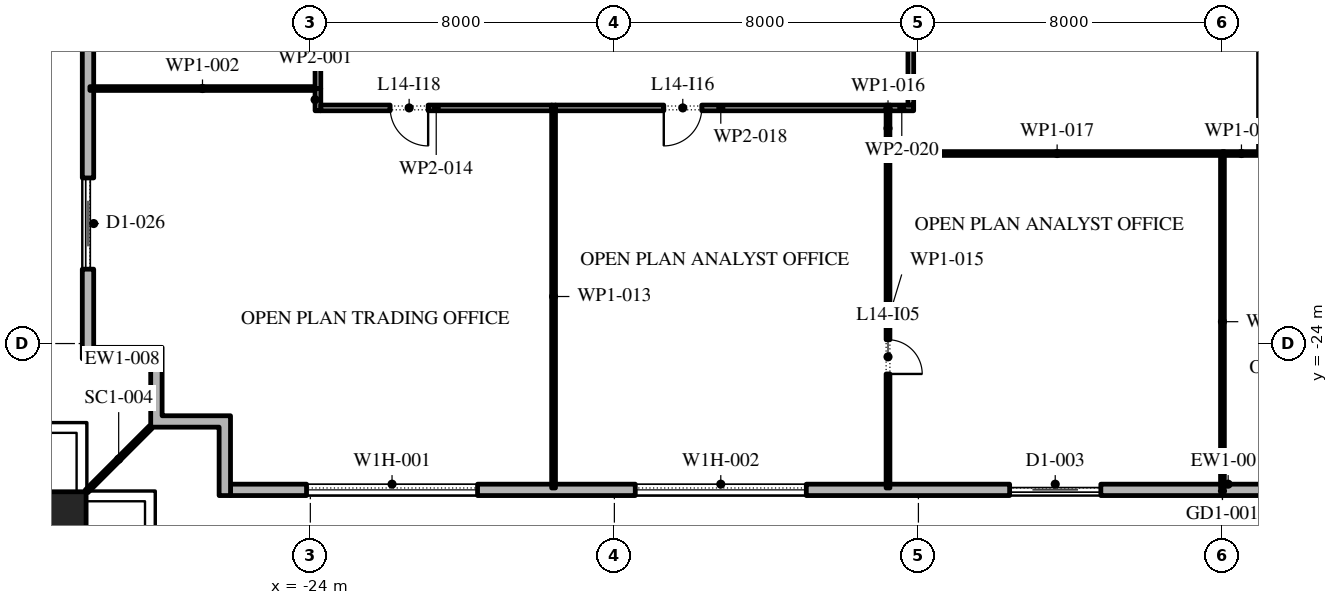
"""IFC4 building model, lengths in metres.
Left out: names, types, materials, properties, quantities, classifications, styles, units other than length and angle.
Written with IfcOpenShell. Run it as: python <this file> out.ifc"""

import sys

from ifc_helpers import new_model, si_unit, direction, frame, frame_2d, origin, origin_2d, place, context, subcontext, project, spatial, polyline, rectangle, outline, extrude, element, fill, save


model = new_model("IFC4")
c1 = context("Model", 3, precision=1e-05, world=origin(), true_north=direction((0.0, 1.0)))
c2 = subcontext(c1, "Body", "Model", "MODEL_VIEW")
j1 = project(units=[si_unit("LENGTHUNIT", "METRE"), si_unit("PLANEANGLEUNIT", "RADIAN")], contexts=[c1])
p1 = place(None, origin())
s1 = spatial("IfcSite", under=j1, at=p1, CompositionType="ELEMENT")
p2 = place(p1, origin())
s2 = spatial("IfcBuilding", under=s1, at=p2, CompositionType="ELEMENT")
p3 = place(p2, frame((0.0, 0.0, 69.0)))
s3 = spatial("IfcBuildingStorey", under=s2, at=p3, CompositionType="ELEMENT", Elevation=69.0)
p4 = place(p3, frame((-30.6, -28.6, 0.0), z_axis=(0.0, 0.0, 1.0), x_axis=(1.0, 0.0, 0.0)))
e1 = element("IfcColumn", 1, at=p4, inside=s3, PredefinedType="COLUMN", context=c2, shape_type="SweptSolid", body=[
    extrude(rectangle(XDim=1.4, YDim=1.4, at=origin_2d()), origin(), (0.0, 0.0, 1.0), 4.2),
])
p5 = place(p3, frame((-26.1, -27.85, 0.0), z_axis=(0.0, 0.0, 1.0), x_axis=(1.0, 0.0, 0.0)))
e2 = element("IfcWall", 2, at=p5, inside=s3, PredefinedType="STANDARD", context=c2, shape_type="SweptSolid", body=[
    extrude(rectangle(XDim=52.5, YDim=0.3, at=frame_2d((26.25, 0.0))), origin(), (0.0, 0.0, 1.0), 4.0),
])
p6 = place(p5, frame((2.0, 0.0, 0.45)))
e3 = element("IfcOpeningElement", 3, at=p6, cuts=e2, PredefinedType="OPENING", context=c2, shape_type="SweptSolid", body=[
    extrude(rectangle(XDim=4.5, YDim=2.75, at=frame_2d((2.25, 1.375))), frame((0.0, 0.16, 0.0), z_axis=(0.0, -1.0, 0.0), x_axis=(1.0, 0.0, 0.0)), (0.0, 0.0, 1.0), 0.32),
])
p7 = place(p5, frame((10.65, 0.0, 0.45)))
e4 = element("IfcOpeningElement", 4, at=p7, cuts=e2, PredefinedType="OPENING", context=c2, shape_type="SweptSolid", body=[
    extrude(rectangle(XDim=4.5, YDim=2.75, at=frame_2d((2.25, 1.375))), frame((0.0, 0.16, 0.0), z_axis=(0.0, -1.0, 0.0), x_axis=(1.0, 0.0, 0.0)), (0.0, 0.0, 1.0), 0.32),
])
p8 = place(p5, frame((20.5, 0.0, 0.0)))
e5 = element("IfcOpeningElement", 5, at=p8, cuts=e2, PredefinedType="OPENING", context=c2, shape_type="SweptSolid", body=[
    extrude(rectangle(XDim=2.4, YDim=3.5, at=frame_2d((1.2, 1.75))), frame((0.0, 0.16, 0.0), z_axis=(0.0, -1.0, 0.0), x_axis=(1.0, 0.0, 0.0)), (0.0, 0.0, 1.0), 0.32),
])
p9 = place(p5, frame((28.25, 0.0, 0.45)))
e6 = element("IfcOpeningElement", 6, at=p9, cuts=e2, PredefinedType="OPENING", context=c2, shape_type="SweptSolid", body=[
    extrude(rectangle(XDim=4.5, YDim=2.75, at=frame_2d((2.25, 1.375))), frame((0.0, 0.16, 0.0), z_axis=(0.0, -1.0, 0.0), x_axis=(1.0, 0.0, 0.0)), (0.0, 0.0, 1.0), 0.32),
])
p10 = place(p5, frame((37.05, 0.0, 0.45)))
e7 = element("IfcOpeningElement", 7, at=p10, cuts=e2, PredefinedType="OPENING", context=c2, shape_type="SweptSolid", body=[
    extrude(rectangle(XDim=4.5, YDim=2.75, at=frame_2d((2.25, 1.375))), frame((0.0, 0.16, 0.0), z_axis=(0.0, -1.0, 0.0), x_axis=(1.0, 0.0, 0.0)), (0.0, 0.0, 1.0), 0.32),
])
p11 = place(p5, frame((45.85, 0.0, 0.45)))
e8 = element("IfcOpeningElement", 8, at=p11, cuts=e2, PredefinedType="OPENING", context=c2, shape_type="SweptSolid", body=[
    extrude(rectangle(XDim=4.5, YDim=2.75, at=frame_2d((2.25, 1.375))), frame((0.0, 0.16, 0.0), z_axis=(0.0, -1.0, 0.0), x_axis=(1.0, 0.0, 0.0)), (0.0, 0.0, 1.0), 0.32),
])
p12 = place(p3, frame((-29.85, 25.1, 0.0), z_axis=(0.0, 0.0, 1.0), x_axis=(0.0, -1.0, 0.0)))
e9 = element("IfcWall", 9, at=p12, inside=s3, PredefinedType="STANDARD", context=c2, shape_type="SweptSolid", body=[
    extrude(rectangle(XDim=49.5, YDim=0.3, at=frame_2d((24.75, 0.0))), origin(), (0.0, 0.0, 1.0), 4.0),
])
p13 = place(p12, frame((1.157, 0.0, 0.45)))
e10 = element("IfcOpeningElement", 10, at=p13, cuts=e9, PredefinedType="OPENING", context=c2, shape_type="SweptSolid", body=[
    extrude(rectangle(XDim=4.5, YDim=2.875, at=frame_2d((2.25, 1.438))), frame((0.0, 0.16, 0.0), z_axis=(0.0, -1.0, 0.0), x_axis=(1.0, 0.0, 0.0)), (0.0, 0.0, 1.0), 0.32),
])
p14 = place(p12, frame((8.121, 0.0, 0.45)))
e11 = element("IfcOpeningElement", 11, at=p14, cuts=e9, PredefinedType="OPENING", context=c2, shape_type="SweptSolid", body=[
    extrude(rectangle(XDim=4.5, YDim=3.05, at=frame_2d((2.25, 1.525))), frame((0.0, 0.16, 0.0), z_axis=(0.0, -1.0, 0.0), x_axis=(1.0, 0.0, 0.0)), (0.0, 0.0, 1.0), 0.32),
])
p15 = place(p12, frame((16.286, 0.0, 0.0)))
e12 = element("IfcOpeningElement", 12, at=p15, cuts=e9, PredefinedType="OPENING", context=c2, shape_type="SweptSolid", body=[
    extrude(rectangle(XDim=2.4, YDim=3.325, at=frame_2d((1.2, 1.663))), frame((0.0, 0.16, 0.0), z_axis=(0.0, -1.0, 0.0), x_axis=(1.0, 0.0, 0.0)), (0.0, 0.0, 1.0), 0.32),
])
p16 = place(p12, frame((22.35, 0.0, 0.45)))
e13 = element("IfcOpeningElement", 13, at=p16, cuts=e9, PredefinedType="OPENING", context=c2, shape_type="SweptSolid", body=[
    extrude(rectangle(XDim=4.5, YDim=2.875, at=frame_2d((2.25, 1.438))), frame((0.0, 0.16, 0.0), z_axis=(0.0, -1.0, 0.0), x_axis=(1.0, 0.0, 0.0)), (0.0, 0.0, 1.0), 0.32),
])
p17 = place(p12, frame((29.464, 0.0, 0.45)))
e14 = element("IfcOpeningElement", 14, at=p17, cuts=e9, PredefinedType="OPENING", context=c2, shape_type="SweptSolid", body=[
    extrude(rectangle(XDim=4.5, YDim=2.875, at=frame_2d((2.25, 1.438))), frame((0.0, 0.16, 0.0), z_axis=(0.0, -1.0, 0.0), x_axis=(1.0, 0.0, 0.0)), (0.0, 0.0, 1.0), 0.32),
])
p18 = place(p12, frame((36.579, 0.0, 0.45)))
e15 = element("IfcOpeningElement", 15, at=p18, cuts=e9, PredefinedType="OPENING", context=c2, shape_type="SweptSolid", body=[
    extrude(rectangle(XDim=4.5, YDim=2.825, at=frame_2d((2.25, 1.413))), frame((0.0, 0.16, 0.0), z_axis=(0.0, -1.0, 0.0), x_axis=(1.0, 0.0, 0.0)), (0.0, 0.0, 1.0), 0.32),
])
p19 = place(p12, frame((44.743, 0.0, 0.0)))
e16 = element("IfcOpeningElement", 16, at=p19, cuts=e9, PredefinedType="OPENING", context=c2, shape_type="SweptSolid", body=[
    extrude(rectangle(XDim=2.4, YDim=3.5, at=frame_2d((1.2, 1.75))), frame((0.0, 0.16, 0.0), z_axis=(0.0, -1.0, 0.0), x_axis=(1.0, 0.0, 0.0)), (0.0, 0.0, 1.0), 0.32),
])
p20 = place(p3, origin())
e17 = element("IfcWall", 17, at=p20, inside=s3, PredefinedType="STANDARD", context=c2, shape_type="SweptSolid", body=[
    extrude(outline(polyline([(-26.4, -26.2), (-28.2, -26.2), (-28.2, -24.4), (-29.7, -24.4), (-29.7, -24.1), (-27.9, -24.1), (-27.9, -25.9), (-26.1, -25.9), (-26.1, -28.0), (-26.4, -28.0), (-26.4, -26.2)])), origin(), (0.0, 0.0, 1.0), 4.0),
])
p21 = place(p3, frame((-28.2, -26.2, -0.05), z_axis=(0.0, 0.0, 1.0), x_axis=(-0.707106781187, -0.707106781187, 0.0)))
e18 = element("IfcWall", 18, at=p21, inside=s3, PredefinedType="STANDARD", context=c2, shape_type="SweptSolid", body=[
    extrude(rectangle(XDim=2.385, YDim=0.1, at=frame_2d((1.192, 0.0))), origin(), (0.0, 0.0, 1.0), 4.05),
])
p22 = place(p3, frame((-23.8, -17.875, 0.0), z_axis=(0.0, 0.0, 1.0), x_axis=(0.0, 1.0, 0.0)))
e19 = element("IfcWall", 19, at=p22, inside=s3, PredefinedType="PARTITIONING", context=c2, shape_type="SweptSolid", body=[
    extrude(rectangle(XDim=0.585, YDim=0.15, at=frame_2d((0.292, 0.0))), origin(), (0.0, 0.0, 1.0), 4.0),
])
p23 = place(p3, frame((-23.875, -17.29, 0.0), z_axis=(0.0, 0.0, 1.0), x_axis=(-1.0, 0.0, 0.0)))
e20 = element("IfcWall", 20, at=p23, inside=s3, PredefinedType="PARTITIONING", context=c2, shape_type="SweptSolid", body=[
    extrude(rectangle(XDim=5.925, YDim=0.1, at=frame_2d((2.962, 0.0))), origin(), (0.0, 0.0, 1.0), 4.0),
])
p24 = place(p3, frame((-23.8, -17.29, 0.0), z_axis=(0.0, 0.0, 1.0), x_axis=(0.0, 1.0, 0.0)))
e21 = element("IfcWall", 21, at=p24, inside=s3, PredefinedType="PARTITIONING", context=c2, shape_type="SweptSolid", body=[
    extrude(rectangle(XDim=7.17, YDim=0.15, at=frame_2d((3.585, 0.0))), origin(), (0.0, 0.0, 1.0), 4.0),
])
p25 = place(p24, frame((2.47, 0.0, 0.0)))
e22 = element("IfcOpeningElement", 22, at=p25, cuts=e21, PredefinedType="OPENING", context=c2, shape_type="SweptSolid", body=[
    extrude(rectangle(XDim=1.0, YDim=2.1, at=frame_2d((0.5, 1.05))), frame((0.0, 0.085, 0.0), z_axis=(0.0, -1.0, 0.0), x_axis=(1.0, 0.0, 0.0)), (0.0, 0.0, 1.0), 0.17),
])
p26 = place(p3, frame((-17.6, -27.8, 0.0), z_axis=(0.0, 0.0, 1.0), x_axis=(0.0, 1.0, 0.0)))
e23 = element("IfcWall", 23, at=p26, inside=s3, PredefinedType="PARTITIONING", context=c2, shape_type="SweptSolid", body=[
    extrude(rectangle(XDim=10.075, YDim=0.1, at=frame_2d((5.038, 0.0))), origin(), (0.0, 0.0, 1.0), 4.0),
])
p27 = place(p3, frame((-17.65, -17.8, 0.0), z_axis=(0.0, 0.0, 1.0), x_axis=(-1.0, 0.0, 0.0)))
e24 = element("IfcWall", 24, at=p27, inside=s3, PredefinedType="PARTITIONING", context=c2, shape_type="SweptSolid", body=[
    extrude(rectangle(XDim=6.075, YDim=0.15, at=frame_2d((3.038, 0.0))), origin(), (0.0, 0.0, 1.0), 4.0),
])
p28 = place(p27, frame((3.25, 0.0, 0.0)))
e25 = element("IfcOpeningElement", 25, at=p28, cuts=e24, PredefinedType="OPENING", context=c2, shape_type="SweptSolid", body=[
    extrude(rectangle(XDim=1.0, YDim=2.1, at=frame_2d((0.5, 1.05))), frame((0.0, 0.085, 0.0), z_axis=(0.0, -1.0, 0.0), x_axis=(1.0, 0.0, 0.0)), (0.0, 0.0, 1.0), 0.17),
])
p29 = place(p3, frame((-8.8, -27.8, 0.0), z_axis=(0.0, 0.0, 1.0), x_axis=(0.0, 1.0, 0.0)))
e26 = element("IfcWall", 26, at=p29, inside=s3, PredefinedType="PARTITIONING", context=c2, shape_type="SweptSolid", body=[
    extrude(rectangle(XDim=8.85, YDim=0.1, at=frame_2d((4.425, 0.0))), origin(), (0.0, 0.0, 1.0), 4.0),
])
p30 = place(p29, frame((3.0, 0.0, 0.0)))
e27 = element("IfcOpeningElement", 27, at=p30, cuts=e26, PredefinedType="OPENING", context=c2, shape_type="SweptSolid", body=[
    extrude(rectangle(XDim=0.9, YDim=2.1, at=frame_2d((0.45, 1.05))), frame((0.0, 0.06, 0.0), z_axis=(0.0, -1.0, 0.0), x_axis=(1.0, 0.0, 0.0)), (0.0, 0.0, 1.0), 0.12),
])
p31 = place(p3, frame((-8.8, -18.95, 0.0), z_axis=(0.0, 0.0, 1.0), x_axis=(0.0, 1.0, 0.0)))
e28 = element("IfcWall", 28, at=p31, inside=s3, PredefinedType="PARTITIONING", context=c2, shape_type="SweptSolid", body=[
    extrude(rectangle(XDim=1.225, YDim=0.1, at=frame_2d((0.612, 0.0))), origin(), (0.0, 0.0, 1.0), 4.0),
])
p32 = place(p3, frame((-8.75, -19.0, 0.0), z_axis=(0.0, 0.0, 1.0), x_axis=(1.0, 0.0, 0.0)))
e29 = element("IfcWall", 29, at=p32, inside=s3, PredefinedType="PARTITIONING", context=c2, shape_type="SweptSolid", body=[
    extrude(rectangle(XDim=8.8, YDim=0.1, at=frame_2d((4.4, 0.0))), origin(), (0.0, 0.0, 1.0), 4.0),
])
p33 = place(p3, frame((-8.85, -17.8, 0.0), z_axis=(0.0, 0.0, 1.0), x_axis=(-1.0, 0.0, 0.0)))
e30 = element("IfcWall", 30, at=p33, inside=s3, PredefinedType="PARTITIONING", context=c2, shape_type="SweptSolid", body=[
    extrude(rectangle(XDim=8.7, YDim=0.15, at=frame_2d((4.35, 0.0))), origin(), (0.0, 0.0, 1.0), 4.0),
])
p34 = place(p33, frame((4.85, 0.0, 0.0)))
e31 = element("IfcOpeningElement", 31, at=p34, cuts=e30, PredefinedType="OPENING", context=c2, shape_type="SweptSolid", body=[
    extrude(rectangle(XDim=1.0, YDim=2.1, at=frame_2d((0.5, 1.05))), frame((0.0, 0.085, 0.0), z_axis=(0.0, -1.0, 0.0), x_axis=(1.0, 0.0, 0.0)), (0.0, 0.0, 1.0), 0.17),
])
p35 = place(p3, frame((-8.125, -17.8, 0.0), z_axis=(0.0, 0.0, 1.0), x_axis=(-1.0, 0.0, 0.0)))
e32 = element("IfcWall", 32, at=p35, inside=s3, PredefinedType="PARTITIONING", context=c2, shape_type="SweptSolid", body=[
    extrude(rectangle(XDim=0.625, YDim=0.15, at=frame_2d((0.312, 0.0))), origin(), (0.0, 0.0, 1.0), 4.0),
])
p36 = place(p3, frame((-8.2, -4.925, 0.0), z_axis=(0.0, 0.0, 1.0), x_axis=(0.0, -1.0, 0.0)))
e33 = element("IfcWall", 33, at=p36, inside=s3, PredefinedType="PARTITIONING", context=c2, shape_type="SweptSolid", body=[
    extrude(rectangle(XDim=12.8, YDim=0.15, at=frame_2d((6.4, 0.0))), origin(), (0.0, 0.0, 1.0), 4.0),
])
p37 = place(p36, frame((7.225, 0.0, 0.0)))
e34 = element("IfcOpeningElement", 34, at=p37, cuts=e33, PredefinedType="OPENING", context=c2, shape_type="SweptSolid", body=[
    extrude(rectangle(XDim=1.0, YDim=2.1, at=frame_2d((0.5, 1.05))), frame((0.0, 0.085, 0.0), z_axis=(0.0, -1.0, 0.0), x_axis=(1.0, 0.0, 0.0)), (0.0, 0.0, 1.0), 0.17),
])
p38 = place(p3, frame((0.0, -19.05, 0.0), z_axis=(0.0, 0.0, 1.0), x_axis=(0.0, -1.0, 0.0)))
e35 = element("IfcWall", 35, at=p38, inside=s3, PredefinedType="PARTITIONING", context=c2, shape_type="SweptSolid", body=[
    extrude(rectangle(XDim=8.75, YDim=0.1, at=frame_2d((4.375, 0.0))), origin(), (0.0, 0.0, 1.0), 4.0),
])
p39 = place(p3, frame((0.0, -19.0, 0.0), z_axis=(0.0, 0.0, 1.0), x_axis=(1.0, 0.0, 0.0)))
e36 = element("IfcWall", 36, at=p39, inside=s3, PredefinedType="PARTITIONING", context=c2, shape_type="SweptSolid", body=[
    extrude(rectangle(XDim=1.0, YDim=0.1, at=frame_2d((0.5, 0.0))), origin(), (0.0, 0.0, 1.0), 4.0),
])
p40 = place(p6, origin())
e37 = element("IfcWindow", 37, at=p40, inside=s3, PartitioningType="DOUBLE_PANEL_VERTICAL", PredefinedType="WINDOW", context=c2, shape_type="SweptSolid", body=[
    extrude(rectangle(XDim=4.5, YDim=2.75, at=frame_2d((2.25, 1.375))), frame((0.0, 0.03, 0.0), z_axis=(0.0, -1.0, 0.0), x_axis=(1.0, 0.0, 0.0)), (0.0, 0.0, 1.0), 0.06),
])
fill(e3, e37)
p41 = place(p7, origin())
e38 = element("IfcWindow", 38, at=p41, inside=s3, PartitioningType="DOUBLE_PANEL_VERTICAL", PredefinedType="WINDOW", context=c2, shape_type="SweptSolid", body=[
    extrude(rectangle(XDim=4.5, YDim=2.75, at=frame_2d((2.25, 1.375))), frame((0.0, 0.03, 0.0), z_axis=(0.0, -1.0, 0.0), x_axis=(1.0, 0.0, 0.0)), (0.0, 0.0, 1.0), 0.06),
])
fill(e4, e38)
p42 = place(p8, origin())
e39 = element("IfcDoor", 39, at=p42, inside=s3, OperationType="DOUBLE_DOOR_SLIDING", PredefinedType="DOOR", context=c2, shape_type="SweptSolid", body=[
    extrude(rectangle(XDim=2.4, YDim=3.5, at=frame_2d((1.2, 1.75))), frame((0.0, 0.025, 0.0), z_axis=(0.0, -1.0, 0.0), x_axis=(1.0, 0.0, 0.0)), (0.0, 0.0, 1.0), 0.05),
])
fill(e5, e39)
p43 = place(p19, origin())
e40 = element("IfcDoor", 40, at=p43, inside=s3, OperationType="DOUBLE_DOOR_SLIDING", PredefinedType="DOOR", context=c2, shape_type="SweptSolid", body=[
    extrude(rectangle(XDim=2.4, YDim=3.5, at=frame_2d((1.2, 1.75))), frame((0.0, 0.025, 0.0), z_axis=(0.0, -1.0, 0.0), x_axis=(1.0, 0.0, 0.0)), (0.0, 0.0, 1.0), 0.05),
])
fill(e16, e40)
p44 = place(p30, frame((0.9, 0.0, 0.0), z_axis=(0.0, 0.0, 1.0), x_axis=(-1.0, 0.0, 0.0)))
e41 = element("IfcDoor", 41, at=p44, inside=s3, OperationType="SINGLE_SWING_LEFT", PredefinedType="DOOR", context=c2, shape_type="SweptSolid", body=[
    extrude(rectangle(XDim=0.9, YDim=2.1, at=frame_2d((0.45, 1.05))), frame((0.0, 0.025, 0.0), z_axis=(0.0, -1.0, 0.0), x_axis=(1.0, 0.0, 0.0)), (0.0, 0.0, 1.0), 0.05),
])
fill(e27, e41)
p45 = place(p34, origin())
e42 = element("IfcDoor", 42, at=p45, inside=s3, OperationType="SINGLE_SWING_LEFT", PredefinedType="DOOR", context=c2, shape_type="SweptSolid", body=[
    extrude(rectangle(XDim=1.0, YDim=2.1, at=frame_2d((0.5, 1.05))), frame((0.0, 0.025, 0.0), z_axis=(0.0, -1.0, 0.0), x_axis=(1.0, 0.0, 0.0)), (0.0, 0.0, 1.0), 0.05),
])
fill(e31, e42)
p46 = place(p28, origin())
e43 = element("IfcDoor", 43, at=p46, inside=s3, OperationType="SINGLE_SWING_RIGHT", PredefinedType="DOOR", context=c2, shape_type="SweptSolid", body=[
    extrude(rectangle(XDim=1.0, YDim=2.1, at=frame_2d((0.5, 1.05))), frame((0.0, 0.025, 0.0), z_axis=(0.0, -1.0, 0.0), x_axis=(1.0, 0.0, 0.0)), (0.0, 0.0, 1.0), 0.05),
])
fill(e25, e43)
save(model, sys.argv[1])
